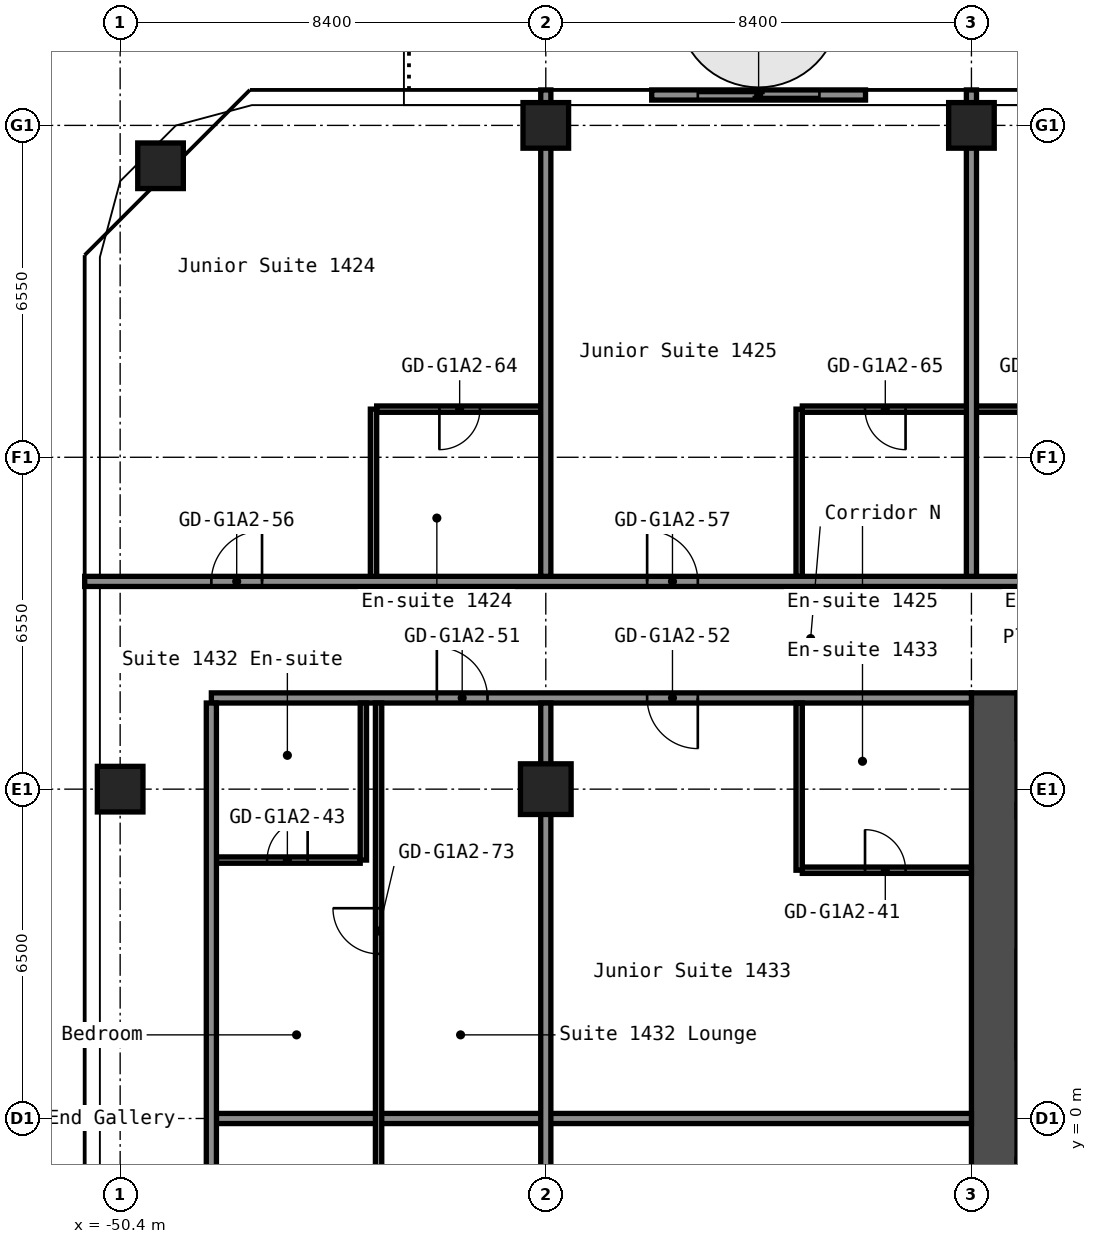
"""IFC4 building model, lengths in metres.
Left out: names, types, materials, properties, quantities, classifications, styles, units other than length and angle.
Written with IfcOpenShell. Run it as: python <this file> out.ifc"""

import sys

from ifc_helpers import new_model, si_unit, direction, frame, frame_2d, origin, origin_2d, place, context, subcontext, project, spatial, rectangle, hollow_rectangle, extrude, element, fill, save


model = new_model("IFC4")
c1 = context("Model", 3, precision=1e-05, world=origin(), true_north=direction((0.0, 1.0)))
c2 = subcontext(c1, "Body", "Model", "MODEL_VIEW")
j1 = project(units=[si_unit("LENGTHUNIT", "METRE"), si_unit("PLANEANGLEUNIT", "RADIAN")], contexts=[c1])
p1 = place(None, origin())
s1 = spatial("IfcSite", under=j1, at=p1, CompositionType="ELEMENT")
p2 = place(p1, origin())
s2 = spatial("IfcBuilding", under=s1, at=p2, CompositionType="ELEMENT")
p3 = place(p2, frame((0.0, 0.0, 51.8)))
s3 = spatial("IfcBuildingStorey", under=s2, at=p3, CompositionType="ELEMENT", Elevation=51.8)
for number, where, z_axis, x_axis in (
    (1, (-50.4, 6.5, 0.0), (0.0, 0.0, 1.0), (1.0, 0.0, 0.0)),
    (2, (-49.603, 18.803, 0.0), (0.0, 0.0, 1.0), (1.0, 0.0, 0.0)),
):
    element("IfcColumn", number, at=place(p3, frame(where, z_axis=z_axis, x_axis=x_axis)), inside=s3, PredefinedType="COLUMN", context=c2, shape_type="SweptSolid", body=[
        extrude(hollow_rectangle(XDim=0.9, YDim=0.9, WallThickness=0.036, at=origin_2d()), origin(), (0.0, 0.0, 1.0), 2.8),
    ])
p4 = place(p3, frame((-42.0, 6.5, 0.0), z_axis=(0.0, 0.0, 1.0), x_axis=(1.0, 0.0, 0.0)))
e3 = element("IfcColumn", 3, at=p4, inside=s3, PredefinedType="COLUMN", context=c2, shape_type="SweptSolid", body=[
    extrude(hollow_rectangle(XDim=1.0, YDim=1.0, WallThickness=0.04, at=origin_2d()), origin(), (0.0, 0.0, 1.0), 2.8),
])
for number, where, z_axis, x_axis in (
    (4, (-42.0, 19.6, 0.0), (0.0, 0.0, 1.0), (1.0, 0.0, 0.0)),
    (5, (-33.6, 19.6, 0.0), (0.0, 0.0, 1.0), (1.0, 0.0, 0.0)),
):
    element("IfcColumn", number, at=place(p3, frame(where, z_axis=z_axis, x_axis=x_axis)), inside=s3, PredefinedType="COLUMN", context=c2, shape_type="SweptSolid", body=[
        extrude(hollow_rectangle(XDim=0.9, YDim=0.9, WallThickness=0.036, at=origin_2d()), origin(), (0.0, 0.0, 1.0), 2.8),
    ])
p5 = place(p3, frame((-33.15, -8.4, 0.0), z_axis=(0.0, 0.0, 1.0), x_axis=(0.0, 1.0, 0.0)))
e6 = element("IfcWall", 6, at=p5, inside=s3, PredefinedType="SHEAR", context=c2, shape_type="SweptSolid", body=[
    extrude(rectangle(XDim=16.8, YDim=0.9, at=frame_2d((8.4, 0.0))), origin(), (0.0, 0.0, 1.0), 2.8),
])
p6 = place(p3, frame((-32.7, 1.325, 0.0), z_axis=(0.0, 0.0, 1.0), x_axis=(1.0, 0.0, 0.0)))
e7 = element("IfcWall", 7, at=p6, inside=s3, PredefinedType="SHEAR", context=c2, shape_type="SweptSolid", body=[
    extrude(rectangle(XDim=5.05, YDim=0.25, at=frame_2d((2.525, 0.0))), origin(), (0.0, 0.0, 1.0), 2.8),
])
p7 = place(p6, frame((3.3, 0.0, 0.0)))
e8 = element("IfcOpeningElement", 8, at=p7, cuts=e7, PredefinedType="OPENING", context=c2, shape_type="SweptSolid", body=[
    extrude(rectangle(XDim=1.2, YDim=2.1, at=frame_2d((0.6, 1.05))), frame((0.0, 0.135, 0.0), z_axis=(0.0, -1.0, 0.0), x_axis=(1.0, 0.0, 0.0)), (0.0, 0.0, 1.0), 0.27),
])
p8 = place(p3, frame((-32.7, -0.875, 0.0), z_axis=(0.0, 0.0, 1.0), x_axis=(1.0, 0.0, 0.0)))
e9 = element("IfcWall", 9, at=p8, inside=s3, PredefinedType="PARTITIONING", context=c2, shape_type="SweptSolid", body=[
    extrude(rectangle(XDim=2.3, YDim=0.15, at=frame_2d((1.15, 0.0))), origin(), (0.0, 0.0, 1.0), 2.8),
])
p9 = place(p3, frame((-48.5, 0.0, 0.0), z_axis=(0.0, 0.0, 1.0), x_axis=(1.0, 0.0, 0.0)))
e10 = element("IfcWall", 10, at=p9, inside=s3, PredefinedType="PARTITIONING", context=c2, shape_type="SweptSolid", body=[
    extrude(rectangle(XDim=14.9, YDim=0.2, at=frame_2d((7.45, 0.0))), origin(), (0.0, 0.0, 1.0), 2.8),
])
p10 = place(p3, frame((-36.938, 4.9, 0.0), z_axis=(0.0, 0.0, 1.0), x_axis=(1.0, 0.0, 0.0)))
e11 = element("IfcWall", 11, at=p10, inside=s3, PredefinedType="PARTITIONING", context=c2, shape_type="SweptSolid", body=[
    extrude(rectangle(XDim=3.337, YDim=0.125, at=frame_2d((1.669, 0.0))), origin(), (0.0, 0.0, 1.0), 2.8),
])
p11 = place(p10, frame((1.238, 0.0, 0.0)))
e12 = element("IfcOpeningElement", 12, at=p11, cuts=e11, PredefinedType="OPENING", context=c2, shape_type="SweptSolid", body=[
    extrude(rectangle(XDim=0.8, YDim=2.1, at=frame_2d((0.4, 1.05))), frame((0.0, 0.073, 0.0), z_axis=(0.0, -1.0, 0.0), x_axis=(1.0, 0.0, 0.0)), (0.0, 0.0, 1.0), 0.145),
])
p12 = place(p3, frame((-48.5, 5.1, 0.0), z_axis=(0.0, 0.0, 1.0), x_axis=(1.0, 0.0, 0.0)))
e13 = element("IfcWall", 13, at=p12, inside=s3, PredefinedType="PARTITIONING", context=c2, shape_type="SweptSolid", body=[
    extrude(rectangle(XDim=2.837, YDim=0.125, at=frame_2d((1.419, 0.0))), origin(), (0.0, 0.0, 1.0), 2.8),
])
p13 = place(p12, frame((1.0, 0.0, 0.0)))
e14 = element("IfcOpeningElement", 14, at=p13, cuts=e13, PredefinedType="OPENING", context=c2, shape_type="SweptSolid", body=[
    extrude(rectangle(XDim=0.8, YDim=2.1, at=frame_2d((0.4, 1.05))), frame((0.0, 0.073, 0.0), z_axis=(0.0, -1.0, 0.0), x_axis=(1.0, 0.0, 0.0)), (0.0, 0.0, 1.0), 0.145),
])
p14 = place(p3, frame((-48.6, 8.3, 0.0), z_axis=(0.0, 0.0, 1.0), x_axis=(1.0, 0.0, 0.0)))
e15 = element("IfcWall", 15, at=p14, inside=s3, PredefinedType="PARTITIONING", context=c2, shape_type="SweptSolid", body=[
    extrude(rectangle(XDim=15.0, YDim=0.2, at=frame_2d((7.5, 0.0))), origin(), (0.0, 0.0, 1.0), 2.8),
])
p15 = place(p14, frame((4.45, 0.0, 0.0)))
e16 = element("IfcOpeningElement", 16, at=p15, cuts=e15, PredefinedType="OPENING", context=c2, shape_type="SweptSolid", body=[
    extrude(rectangle(XDim=1.0, YDim=2.1, at=frame_2d((0.5, 1.05))), frame((0.0, 0.11, 0.0), z_axis=(0.0, -1.0, 0.0), x_axis=(1.0, 0.0, 0.0)), (0.0, 0.0, 1.0), 0.22),
])
p16 = place(p14, frame((8.6, 0.0, 0.0)))
e17 = element("IfcOpeningElement", 17, at=p16, cuts=e15, PredefinedType="OPENING", context=c2, shape_type="SweptSolid", body=[
    extrude(rectangle(XDim=1.0, YDim=2.1, at=frame_2d((0.5, 1.05))), frame((0.0, 0.11, 0.0), z_axis=(0.0, -1.0, 0.0), x_axis=(1.0, 0.0, 0.0)), (0.0, 0.0, 1.0), 0.22),
])
p17 = place(p3, frame((-51.1, 10.6, 0.0), z_axis=(0.0, 0.0, 1.0), x_axis=(1.0, 0.0, 0.0)))
e18 = element("IfcWall", 18, at=p17, inside=s3, PredefinedType="PARTITIONING", context=c2, shape_type="SweptSolid", body=[
    extrude(rectangle(XDim=34.3, YDim=0.2, at=frame_2d((17.15, 0.0))), origin(), (0.0, 0.0, 1.0), 2.8),
])
p18 = place(p17, frame((2.5, 0.0, 0.0)))
e19 = element("IfcOpeningElement", 19, at=p18, cuts=e18, PredefinedType="OPENING", context=c2, shape_type="SweptSolid", body=[
    extrude(rectangle(XDim=1.0, YDim=2.1, at=frame_2d((0.5, 1.05))), frame((0.0, 0.11, 0.0), z_axis=(0.0, -1.0, 0.0), x_axis=(1.0, 0.0, 0.0)), (0.0, 0.0, 1.0), 0.22),
])
p19 = place(p17, frame((11.1, 0.0, 0.0)))
e20 = element("IfcOpeningElement", 20, at=p19, cuts=e18, PredefinedType="OPENING", context=c2, shape_type="SweptSolid", body=[
    extrude(rectangle(XDim=1.0, YDim=2.1, at=frame_2d((0.5, 1.05))), frame((0.0, 0.11, 0.0), z_axis=(0.0, -1.0, 0.0), x_axis=(1.0, 0.0, 0.0)), (0.0, 0.0, 1.0), 0.22),
])
p20 = place(p17, frame((22.9, 0.0, 0.0)))
e21 = element("IfcOpeningElement", 21, at=p20, cuts=e18, PredefinedType="OPENING", context=c2, shape_type="SweptSolid", body=[
    extrude(rectangle(XDim=1.0, YDim=2.1, at=frame_2d((0.5, 1.05))), frame((0.0, 0.11, 0.0), z_axis=(0.0, -1.0, 0.0), x_axis=(1.0, 0.0, 0.0)), (0.0, 0.0, 1.0), 0.22),
])
p21 = place(p17, frame((27.9, 0.0, 0.0)))
e22 = element("IfcOpeningElement", 22, at=p21, cuts=e18, PredefinedType="OPENING", context=c2, shape_type="SweptSolid", body=[
    extrude(rectangle(XDim=1.0, YDim=2.1, at=frame_2d((0.5, 1.05))), frame((0.0, 0.11, 0.0), z_axis=(0.0, -1.0, 0.0), x_axis=(1.0, 0.0, 0.0)), (0.0, 0.0, 1.0), 0.22),
])
p22 = place(p3, frame((-45.337, 14.0, 0.0), z_axis=(0.0, 0.0, 1.0), x_axis=(1.0, 0.0, 0.0)))
e23 = element("IfcWall", 23, at=p22, inside=s3, PredefinedType="PARTITIONING", context=c2, shape_type="SweptSolid", body=[
    extrude(rectangle(XDim=3.237, YDim=0.125, at=frame_2d((1.619, 0.0))), origin(), (0.0, 0.0, 1.0), 2.8),
])
p23 = place(p22, frame((1.238, 0.0, 0.0)))
e24 = element("IfcOpeningElement", 24, at=p23, cuts=e23, PredefinedType="OPENING", context=c2, shape_type="SweptSolid", body=[
    extrude(rectangle(XDim=0.8, YDim=2.1, at=frame_2d((0.4, 1.05))), frame((0.0, 0.073, 0.0), z_axis=(0.0, -1.0, 0.0), x_axis=(1.0, 0.0, 0.0)), (0.0, 0.0, 1.0), 0.145),
])
p24 = place(p3, frame((-36.938, 14.0, 0.0), z_axis=(0.0, 0.0, 1.0), x_axis=(1.0, 0.0, 0.0)))
e25 = element("IfcWall", 25, at=p24, inside=s3, PredefinedType="PARTITIONING", context=c2, shape_type="SweptSolid", body=[
    extrude(rectangle(XDim=6.675, YDim=0.125, at=frame_2d((3.337, 0.0))), origin(), (0.0, 0.0, 1.0), 2.8),
])
p25 = place(p24, frame((1.238, 0.0, 0.0)))
e26 = element("IfcOpeningElement", 26, at=p25, cuts=e25, PredefinedType="OPENING", context=c2, shape_type="SweptSolid", body=[
    extrude(rectangle(XDim=0.8, YDim=2.1, at=frame_2d((0.4, 1.05))), frame((0.0, 0.073, 0.0), z_axis=(0.0, -1.0, 0.0), x_axis=(1.0, 0.0, 0.0)), (0.0, 0.0, 1.0), 0.145),
])
p26 = place(p24, frame((4.637, 0.0, 0.0)))
e27 = element("IfcOpeningElement", 27, at=p26, cuts=e25, PredefinedType="OPENING", context=c2, shape_type="SweptSolid", body=[
    extrude(rectangle(XDim=0.8, YDim=2.1, at=frame_2d((0.4, 1.05))), frame((0.0, 0.073, 0.0), z_axis=(0.0, -1.0, 0.0), x_axis=(1.0, 0.0, 0.0)), (0.0, 0.0, 1.0), 0.145),
])
p27 = place(p3, frame((-48.6, -8.2, 0.0), z_axis=(0.0, 0.0, 1.0), x_axis=(0.0, 1.0, 0.0)))
e28 = element("IfcWall", 28, at=p27, inside=s3, PredefinedType="PARTITIONING", context=c2, shape_type="SweptSolid", body=[
    extrude(rectangle(XDim=16.4, YDim=0.2, at=frame_2d((8.2, 0.0))), origin(), (0.0, 0.0, 1.0), 2.8),
])
p28 = place(p3, frame((-45.6, 5.1, 0.0), z_axis=(0.0, 0.0, 1.0), x_axis=(0.0, 1.0, 0.0)))
e29 = element("IfcWall", 29, at=p28, inside=s3, PredefinedType="PARTITIONING", context=c2, shape_type="SweptSolid", body=[
    extrude(rectangle(XDim=3.1, YDim=0.125, at=frame_2d((1.55, 0.0))), origin(), (0.0, 0.0, 1.0), 2.8),
])
p29 = place(p3, frame((-45.4, 10.7, 0.0), z_axis=(0.0, 0.0, 1.0), x_axis=(0.0, 1.0, 0.0)))
e30 = element("IfcWall", 30, at=p29, inside=s3, PredefinedType="PARTITIONING", context=c2, shape_type="SweptSolid", body=[
    extrude(rectangle(XDim=3.3, YDim=0.125, at=frame_2d((1.65, 0.0))), origin(), (0.0, 0.0, 1.0), 2.8),
])
p30 = place(p3, frame((-45.3, -8.2, 0.0), z_axis=(0.0, 0.0, 1.0), x_axis=(0.0, 1.0, 0.0)))
e31 = element("IfcWall", 31, at=p30, inside=s3, PredefinedType="PARTITIONING", context=c2, shape_type="SweptSolid", body=[
    extrude(rectangle(XDim=16.4, YDim=0.125, at=frame_2d((8.2, 0.0))), origin(), (0.0, 0.0, 1.0), 2.8),
])
p31 = place(p30, frame((4.05, 0.0, 0.0)))
e32 = element("IfcOpeningElement", 32, at=p31, cuts=e31, PredefinedType="OPENING", context=c2, shape_type="SweptSolid", body=[
    extrude(rectangle(XDim=0.9, YDim=2.1, at=frame_2d((0.45, 1.05))), frame((0.0, 0.073, 0.0), z_axis=(0.0, -1.0, 0.0), x_axis=(1.0, 0.0, 0.0)), (0.0, 0.0, 1.0), 0.145),
])
p32 = place(p30, frame((11.45, 0.0, 0.0)))
e33 = element("IfcOpeningElement", 33, at=p32, cuts=e31, PredefinedType="OPENING", context=c2, shape_type="SweptSolid", body=[
    extrude(rectangle(XDim=0.9, YDim=2.1, at=frame_2d((0.45, 1.05))), frame((0.0, 0.073, 0.0), z_axis=(0.0, -1.0, 0.0), x_axis=(1.0, 0.0, 0.0)), (0.0, 0.0, 1.0), 0.145),
])
p33 = place(p3, frame((-42.0, -8.2, 0.0), z_axis=(0.0, 0.0, 1.0), x_axis=(0.0, 1.0, 0.0)))
e34 = element("IfcWall", 34, at=p33, inside=s3, PredefinedType="PARTITIONING", context=c2, shape_type="SweptSolid", body=[
    extrude(rectangle(XDim=16.4, YDim=0.2, at=frame_2d((8.2, 0.0))), origin(), (0.0, 0.0, 1.0), 2.8),
])
p34 = place(p3, frame((-42.0, 10.7, 0.0), z_axis=(0.0, 0.0, 1.0), x_axis=(0.0, 1.0, 0.0)))
e35 = element("IfcWall", 35, at=p34, inside=s3, PredefinedType="PARTITIONING", context=c2, shape_type="SweptSolid", body=[
    extrude(rectangle(XDim=9.6, YDim=0.2, at=frame_2d((4.8, 0.0))), origin(), (0.0, 0.0, 1.0), 2.8),
])
for number, where, z_axis, x_axis in (
    (36, (-37.0, 4.9, 0.0), (0.0, 0.0, 1.0), (0.0, 1.0, 0.0)),
    (37, (-37.0, 10.7, 0.0), (0.0, 0.0, 1.0), (0.0, 1.0, 0.0)),
):
    element("IfcWall", number, at=place(p3, frame(where, z_axis=z_axis, x_axis=x_axis)), inside=s3, PredefinedType="PARTITIONING", context=c2, shape_type="SweptSolid", body=[
        extrude(rectangle(XDim=3.3, YDim=0.125, at=frame_2d((1.65, 0.0))), origin(), (0.0, 0.0, 1.0), 2.8),
    ])
p35 = place(p3, frame((-33.6, 10.7, 0.0), z_axis=(0.0, 0.0, 1.0), x_axis=(0.0, 1.0, 0.0)))
e38 = element("IfcWall", 38, at=p35, inside=s3, PredefinedType="PARTITIONING", context=c2, shape_type="SweptSolid", body=[
    extrude(rectangle(XDim=9.6, YDim=0.2, at=frame_2d((4.8, 0.0))), origin(), (0.0, 0.0, 1.0), 2.8),
])
p36 = place(p3, frame((-35.69, 20.2, 0.0), z_axis=(0.0, 0.0, 1.0), x_axis=(-1.0, 0.0, 0.0)))
p37 = place(p36, frame((0.91, 0.0, 0.0)))
p38 = place(p37, frame((2.4, 0.0, 0.0), z_axis=(0.0, 0.0, 1.0), x_axis=(-1.0, 0.0, 0.0)))
e39 = element("IfcDoor", 39, at=p38, inside=s3, OperationType="SLIDING_TO_LEFT", PredefinedType="DOOR", context=c2, shape_type="SweptSolid", body=[
    extrude(rectangle(XDim=2.4, YDim=2.2, at=frame_2d((1.2, 1.1))), frame((0.0, 0.025, 0.0), z_axis=(0.0, -1.0, 0.0), x_axis=(1.0, 0.0, 0.0)), (0.0, 0.0, 1.0), 0.05),
])
p39 = place(p11, origin())
e40 = element("IfcDoor", 40, at=p39, inside=s3, OperationType="SINGLE_SWING_RIGHT", PredefinedType="DOOR", context=c2, shape_type="SweptSolid", body=[
    extrude(rectangle(XDim=0.8, YDim=2.1, at=frame_2d((0.4, 1.05))), frame((0.0, 0.025, 0.0), z_axis=(0.0, -1.0, 0.0), x_axis=(1.0, 0.0, 0.0)), (0.0, 0.0, 1.0), 0.05),
])
fill(e12, e40)
p40 = place(p13, origin())
e41 = element("IfcDoor", 41, at=p40, inside=s3, OperationType="SINGLE_SWING_LEFT", PredefinedType="DOOR", context=c2, shape_type="SweptSolid", body=[
    extrude(rectangle(XDim=0.8, YDim=2.1, at=frame_2d((0.4, 1.05))), frame((0.0, 0.025, 0.0), z_axis=(0.0, -1.0, 0.0), x_axis=(1.0, 0.0, 0.0)), (0.0, 0.0, 1.0), 0.05),
])
fill(e14, e41)
p41 = place(p15, origin())
e42 = element("IfcDoor", 42, at=p41, inside=s3, OperationType="SINGLE_SWING_RIGHT", PredefinedType="DOOR", context=c2, shape_type="SweptSolid", body=[
    extrude(rectangle(XDim=1.0, YDim=2.1, at=frame_2d((0.5, 1.05))), frame((0.0, 0.025, 0.0), z_axis=(0.0, -1.0, 0.0), x_axis=(1.0, 0.0, 0.0)), (0.0, 0.0, 1.0), 0.05),
])
fill(e16, e42)
p42 = place(p16, origin())
e43 = element("IfcDoor", 43, at=p42, inside=s3, OperationType="SINGLE_SWING_RIGHT", PredefinedType="DOOR", context=c2, shape_type="SweptSolid", body=[
    extrude(rectangle(XDim=1.0, YDim=2.1, at=frame_2d((0.5, 1.05))), frame((0.0, 0.025, 0.0), z_axis=(0.0, -1.0, 0.0), x_axis=(1.0, 0.0, 0.0)), (0.0, 0.0, 1.0), 0.05),
])
fill(e17, e43)
p43 = place(p18, origin())
e44 = element("IfcDoor", 44, at=p43, inside=s3, OperationType="SINGLE_SWING_LEFT", PredefinedType="DOOR", context=c2, shape_type="SweptSolid", body=[
    extrude(rectangle(XDim=1.0, YDim=2.1, at=frame_2d((0.5, 1.05))), frame((0.0, 0.025, 0.0), z_axis=(0.0, -1.0, 0.0), x_axis=(1.0, 0.0, 0.0)), (0.0, 0.0, 1.0), 0.05),
])
fill(e19, e44)
p44 = place(p19, origin())
e45 = element("IfcDoor", 45, at=p44, inside=s3, OperationType="SINGLE_SWING_RIGHT", PredefinedType="DOOR", context=c2, shape_type="SweptSolid", body=[
    extrude(rectangle(XDim=1.0, YDim=2.1, at=frame_2d((0.5, 1.05))), frame((0.0, 0.025, 0.0), z_axis=(0.0, -1.0, 0.0), x_axis=(1.0, 0.0, 0.0)), (0.0, 0.0, 1.0), 0.05),
])
fill(e20, e45)
p45 = place(p23, origin())
e46 = element("IfcDoor", 46, at=p45, inside=s3, OperationType="SINGLE_SWING_LEFT", PredefinedType="DOOR", context=c2, shape_type="SweptSolid", body=[
    extrude(rectangle(XDim=0.8, YDim=2.1, at=frame_2d((0.4, 1.05))), frame((0.0, 0.025, 0.0), z_axis=(0.0, -1.0, 0.0), x_axis=(1.0, 0.0, 0.0)), (0.0, 0.0, 1.0), 0.05),
])
fill(e24, e46)
p46 = place(p25, origin())
e47 = element("IfcDoor", 47, at=p46, inside=s3, OperationType="SINGLE_SWING_RIGHT", PredefinedType="DOOR", context=c2, shape_type="SweptSolid", body=[
    extrude(rectangle(XDim=0.8, YDim=2.1, at=frame_2d((0.4, 1.05))), frame((0.0, 0.025, 0.0), z_axis=(0.0, -1.0, 0.0), x_axis=(1.0, 0.0, 0.0)), (0.0, 0.0, 1.0), 0.05),
])
fill(e26, e47)
p47 = place(p32, origin())
e48 = element("IfcDoor", 48, at=p47, inside=s3, OperationType="SINGLE_SWING_LEFT", PredefinedType="DOOR", context=c2, shape_type="SweptSolid", body=[
    extrude(rectangle(XDim=0.9, YDim=2.1, at=frame_2d((0.45, 1.05))), frame((0.0, 0.025, 0.0), z_axis=(0.0, -1.0, 0.0), x_axis=(1.0, 0.0, 0.0)), (0.0, 0.0, 1.0), 0.05),
])
fill(e33, e48)
save(model, sys.argv[1])
